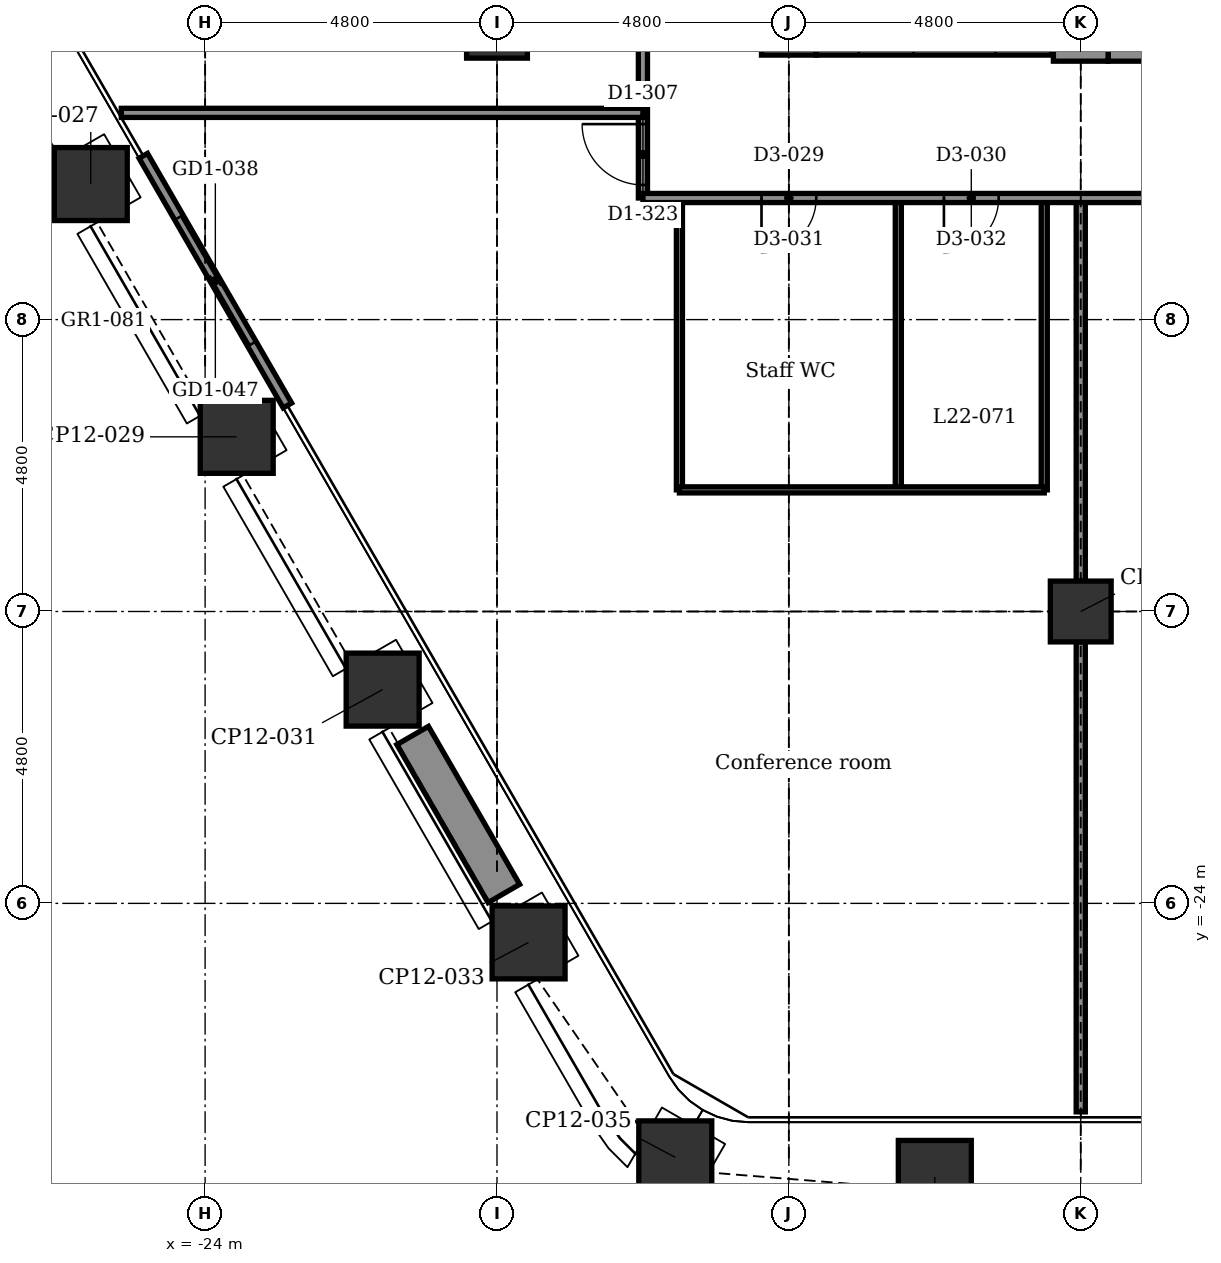
"""IFC4 building model, lengths in metres.
Left out: names, types, materials, properties, quantities, classifications, styles, units other than length and angle.
Written with IfcOpenShell. Run it as: python <this file> out.ifc"""

import sys

from ifc_helpers import new_model, si_unit, direction, frame, frame_2d, origin, origin_2d, place, context, subcontext, project, spatial, rectangle, extrude, element, fill, save


model = new_model("IFC4")
c1 = context("Model", 3, precision=1e-05, world=origin(), true_north=direction((0.0, 1.0)))
c2 = subcontext(c1, "Body", "Model", "MODEL_VIEW")
j1 = project(units=[si_unit("LENGTHUNIT", "METRE"), si_unit("PLANEANGLEUNIT", "RADIAN")], contexts=[c1])
p1 = place(None, origin())
s1 = spatial("IfcSite", under=j1, at=p1, CompositionType="ELEMENT")
p2 = place(p1, origin())
s2 = spatial("IfcBuilding", under=s1, at=p2, CompositionType="ELEMENT")
p3 = place(p2, frame((0.0, 0.0, 113.9)))
s3 = spatial("IfcBuildingStorey", under=s2, at=p3, CompositionType="ELEMENT", Elevation=113.9)
for number, where, z_axis, x_axis in (
    (1, (-12.0, -28.499, -0.2), (0.0, 0.0, 1.0), (1.0, 0.0, 0.0)),
    (2, (-16.268, -28.177, -0.2), (0.0, 0.0, 1.0), (0.5, 0.866, 0.0)),
    (3, (-18.68, -24.642, -0.2), (0.0, 0.0, 1.0), (0.866, 0.5, 0.0)),
    (4, (-21.08, -20.485, -0.2), (0.0, 0.0, 1.0), (0.866, 0.5, 0.0)),
    (5, (-23.48, -16.328, -0.2), (0.0, 0.0, 1.0), (0.866, 0.5, 0.0)),
    (6, (-25.88, -12.171, -0.2), (0.0, 0.0, 1.0), (0.866, 0.5, 0.0)),
):
    element("IfcColumn", number, at=place(p3, frame(where, z_axis=z_axis, x_axis=x_axis)), inside=s3, PredefinedType="COLUMN", context=c2, shape_type="SweptSolid", body=[
        extrude(rectangle(XDim=1.2, YDim=1.2, at=origin_2d()), origin(), (0.0, 0.0, 1.0), 4.5),
    ])
for number, where, z_axis, x_axis in (
    (7, (-19.2, -9.6, -0.2), (0.0, 0.0, 1.0), (1.0, 0.0, 0.0)),
    (8, (-9.6, -19.2, -0.2), (0.0, 0.0, 1.0), (1.0, 0.0, 0.0)),
):
    element("IfcColumn", number, at=place(p3, frame(where, z_axis=z_axis, x_axis=x_axis)), inside=s3, PredefinedType="COLUMN", context=c2, shape_type="SweptSolid", body=[
        extrude(rectangle(XDim=1.0, YDim=1.0, at=origin_2d()), origin(), (0.0, 0.0, 1.0), 4.5),
    ])
p4 = place(p3, frame((-9.15, -10.0, -0.2), z_axis=(0.0, 0.0, 1.0), x_axis=(1.0, 0.0, 0.0)))
e9 = element("IfcWall", 9, at=p4, inside=s3, PredefinedType="STANDARD", context=c2, shape_type="SweptSolid", body=[
    extrude(rectangle(XDim=3.9, YDim=0.3, at=frame_2d((1.95, 0.0))), origin(), (0.0, 0.0, 1.0), 4.5),
])
p5 = place(p3, frame((-13.95, -9.6, -0.2), z_axis=(0.0, 0.0, 1.0), x_axis=(1.0, 0.0, 0.0)))
e10 = element("IfcWall", 10, at=p5, inside=s3, PredefinedType="SHEAR", context=c2, shape_type="SweptSolid", body=[
    extrude(rectangle(XDim=3.9, YDim=0.9, at=frame_2d((1.95, 0.0))), origin(), (0.0, 0.0, 1.0), 4.5),
])
p6 = place(p5, frame((0.7, 0.0, 0.2)))
e11 = element("IfcOpeningElement", 11, at=p6, cuts=e10, PredefinedType="OPENING", context=c2, shape_type="SweptSolid", body=[
    extrude(rectangle(XDim=0.9, YDim=2.1, at=frame_2d((0.45, 1.05))), frame((0.0, 0.46, 0.0), z_axis=(0.0, -1.0, 0.0), x_axis=(1.0, 0.0, 0.0)), (0.0, 0.0, 1.0), 0.92),
])
p7 = place(p5, frame((2.95, 0.0, 0.2)))
e12 = element("IfcOpeningElement", 12, at=p7, cuts=e10, PredefinedType="OPENING", context=c2, shape_type="SweptSolid", body=[
    extrude(rectangle(XDim=0.9, YDim=2.1, at=frame_2d((0.45, 1.05))), frame((0.0, 0.46, 0.0), z_axis=(0.0, -1.0, 0.0), x_axis=(1.0, 0.0, 0.0)), (0.0, 0.0, 1.0), 0.92),
])
p8 = place(p3, frame((-14.4, -10.05, -0.2), z_axis=(0.0, 0.0, 1.0), x_axis=(0.0, 1.0, 0.0)))
e13 = element("IfcWall", 13, at=p8, inside=s3, PredefinedType="SHEAR", context=c2, shape_type="SweptSolid", body=[
    extrude(rectangle(XDim=20.1, YDim=0.9, at=frame_2d((10.05, 0.0))), origin(), (0.0, 0.0, 1.0), 4.5),
])
p9 = place(p8, frame((3.5, 0.0, 0.2)))
e14 = element("IfcOpeningElement", 14, at=p9, cuts=e13, PredefinedType="OPENING", context=c2, shape_type="SweptSolid", body=[
    extrude(rectangle(XDim=1.1, YDim=2.1, at=frame_2d((0.55, 1.05))), frame((0.0, 0.46, 0.0), z_axis=(0.0, -1.0, 0.0), x_axis=(1.0, 0.0, 0.0)), (0.0, 0.0, 1.0), 0.92),
])
p10 = place(p8, frame((5.9, 0.0, 0.2)))
e15 = element("IfcOpeningElement", 15, at=p10, cuts=e13, PredefinedType="OPENING", context=c2, shape_type="SweptSolid", body=[
    extrude(rectangle(XDim=1.1, YDim=2.1, at=frame_2d((0.55, 1.05))), frame((0.0, 0.46, 0.0), z_axis=(0.0, -1.0, 0.0), x_axis=(1.0, 0.0, 0.0)), (0.0, 0.0, 1.0), 0.92),
])
p11 = place(p8, frame((8.3, 0.0, 0.2)))
e16 = element("IfcOpeningElement", 16, at=p11, cuts=e13, PredefinedType="OPENING", context=c2, shape_type="SweptSolid", body=[
    extrude(rectangle(XDim=1.1, YDim=2.1, at=frame_2d((0.55, 1.05))), frame((0.0, 0.46, 0.0), z_axis=(0.0, -1.0, 0.0), x_axis=(1.0, 0.0, 0.0)), (0.0, 0.0, 1.0), 0.92),
])
p12 = place(p8, frame((10.7, 0.0, 0.2)))
e17 = element("IfcOpeningElement", 17, at=p12, cuts=e13, PredefinedType="OPENING", context=c2, shape_type="SweptSolid", body=[
    extrude(rectangle(XDim=1.1, YDim=2.1, at=frame_2d((0.55, 1.05))), frame((0.0, 0.46, 0.0), z_axis=(0.0, -1.0, 0.0), x_axis=(1.0, 0.0, 0.0)), (0.0, 0.0, 1.0), 0.92),
])
p13 = place(p3, frame((-9.6, -10.15, -0.2), z_axis=(0.0, 0.0, 1.0), x_axis=(0.0, 1.0, 0.0)))
e18 = element("IfcWall", 18, at=p13, inside=s3, PredefinedType="SHEAR", context=c2, shape_type="SweptSolid", body=[
    extrude(rectangle(XDim=7.6, YDim=0.9, at=frame_2d((3.8, 0.0))), origin(), (0.0, 0.0, 1.0), 4.5),
])
p14 = place(p3, frame((-22.647, -15.812, 0.0), z_axis=(0.0, 0.0, 1.0), x_axis=(-0.499978080042, 0.866038058908, 0.0)))
e19 = element("IfcWall", 19, at=p14, inside=s3, PredefinedType="PARTITIONING", context=c2, shape_type="SweptSolid", body=[
    extrude(rectangle(XDim=4.74, YDim=0.16, at=frame_2d((2.37, 0.0))), origin(), (0.0, 0.0, 1.0), 4.3),
])
p15 = place(p14, frame((1.17, 0.0, 0.0)))
e20 = element("IfcOpeningElement", 20, at=p15, cuts=e19, PredefinedType="OPENING", context=c2, shape_type="SweptSolid", body=[
    extrude(rectangle(XDim=2.4, YDim=2.4, at=frame_2d((1.2, 1.2))), frame((0.0, 0.09, 0.0), z_axis=(0.0, -1.0, 0.0), x_axis=(1.0, 0.0, 0.0)), (0.0, 0.0, 1.0), 0.18),
])
p16 = place(p3, frame((-19.087, -23.837, 0.0), z_axis=(0.0, 0.0, 1.0), x_axis=(-0.499990139034, 0.866031096941, 0.0)))
e21 = element("IfcWall", 21, at=p16, inside=s3, PredefinedType="USERDEFINED", context=c2, shape_type="SweptSolid", body=[
    extrude(rectangle(XDim=3.0, YDim=0.6, at=frame_2d((1.5, 0.0))), origin(), (0.0, 0.0, 1.0), 0.7),
])
p17 = place(p3, frame((-9.6, -27.428, 0.0), z_axis=(0.0, 0.0, 1.0), x_axis=(0.0, 1.0, 0.0)))
e22 = element("IfcWall", 22, at=p17, inside=s3, PredefinedType="PARTITIONING", context=c2, shape_type="SweptSolid", body=[
    extrude(rectangle(XDim=7.729, YDim=0.15, at=frame_2d((3.864, 0.0))), origin(), (0.0, 0.0, 1.0), 3.843),
])
p18 = place(p3, frame((-9.6, -18.7, 0.0), z_axis=(0.0, 0.0, 1.0), x_axis=(0.0, 1.0, 0.0)))
e23 = element("IfcWall", 23, at=p18, inside=s3, PredefinedType="PARTITIONING", context=c2, shape_type="SweptSolid", body=[
    extrude(rectangle(XDim=6.3, YDim=0.15, at=frame_2d((3.15, 0.0))), origin(), (0.0, 0.0, 1.0), 3.843),
])
for number, where, z_axis, x_axis in (
    (24, (-10.2, -17.2, 0.0), (0.0, 0.0, 1.0), (0.0, 1.0, 0.0)),
    (25, (-12.6, -17.2, 0.0), (0.0, 0.0, 1.0), (0.0, 1.0, 0.0)),
    (26, (-16.2, -17.2, 0.0), (0.0, 0.0, 1.0), (0.0, 1.0, 0.0)),
):
    element("IfcWall", number, at=place(p3, frame(where, z_axis=z_axis, x_axis=x_axis)), inside=s3, PredefinedType="PARTITIONING", context=c2, shape_type="SweptSolid", body=[
        extrude(rectangle(XDim=4.8, YDim=0.1, at=frame_2d((2.4, 0.0))), origin(), (0.0, 0.0, 1.0), 4.3),
    ])
p19 = place(p3, frame((-16.8, -12.4, 0.0), z_axis=(0.0, 0.0, 1.0), x_axis=(0.0, 1.0, 0.0)))
e27 = element("IfcWall", 27, at=p19, inside=s3, PredefinedType="PARTITIONING", context=c2, shape_type="SweptSolid", body=[
    extrude(rectangle(XDim=8.45, YDim=0.15, at=frame_2d((4.225, 0.0))), origin(), (0.0, 0.0, 1.0), 4.3),
])
p20 = place(p19, frame((0.215, 0.0, 0.0)))
e28 = element("IfcOpeningElement", 28, at=p20, cuts=e27, PredefinedType="OPENING", context=c2, shape_type="SweptSolid", body=[
    extrude(rectangle(XDim=1.0, YDim=2.1, at=frame_2d((0.5, 1.05))), frame((0.0, 0.085, 0.0), z_axis=(0.0, -1.0, 0.0), x_axis=(1.0, 0.0, 0.0)), (0.0, 0.0, 1.0), 0.17),
])
p21 = place(p19, frame((5.2, 0.0, 0.0)))
e29 = element("IfcOpeningElement", 29, at=p21, cuts=e27, PredefinedType="OPENING", context=c2, shape_type="SweptSolid", body=[
    extrude(rectangle(XDim=1.0, YDim=2.1, at=frame_2d((0.5, 1.05))), frame((0.0, 0.085, 0.0), z_axis=(0.0, -1.0, 0.0), x_axis=(1.0, 0.0, 0.0)), (0.0, 0.0, 1.0), 0.17),
])
p22 = place(p3, frame((-16.2, -17.2, 0.0), z_axis=(0.0, 0.0, 1.0), x_axis=(1.0, 0.0, 0.0)))
e30 = element("IfcWall", 30, at=p22, inside=s3, PredefinedType="PARTITIONING", context=c2, shape_type="SweptSolid", body=[
    extrude(rectangle(XDim=6.0, YDim=0.1, at=frame_2d((3.0, 0.0))), origin(), (0.0, 0.0, 1.0), 4.3),
])
p23 = place(p3, frame((-16.8, -12.4, 0.0), z_axis=(0.0, 0.0, 1.0), x_axis=(1.0, 0.0, 0.0)))
e31 = element("IfcWall", 31, at=p23, inside=s3, PredefinedType="PARTITIONING", context=c2, shape_type="SweptSolid", body=[
    extrude(rectangle(XDim=33.6, YDim=0.15, at=frame_2d((16.8, 0.0))), origin(), (0.0, 0.0, 1.0), 4.3),
])
p24 = place(p23, frame((9.1, 0.0, 0.0)))
e32 = element("IfcOpeningElement", 32, at=p24, cuts=e31, PredefinedType="OPENING", context=c2, shape_type="SweptSolid", body=[
    extrude(rectangle(XDim=1.0, YDim=2.1, at=frame_2d((0.5, 1.05))), frame((0.0, 0.085, 0.0), z_axis=(0.0, -1.0, 0.0), x_axis=(1.0, 0.0, 0.0)), (0.0, 0.0, 1.0), 0.17),
])
p25 = place(p23, frame((14.915, 0.0, 0.0)))
e33 = element("IfcOpeningElement", 33, at=p25, cuts=e31, PredefinedType="OPENING", context=c2, shape_type="SweptSolid", body=[
    extrude(rectangle(XDim=1.0, YDim=2.1, at=frame_2d((0.5, 1.05))), frame((0.0, 0.085, 0.0), z_axis=(0.0, -1.0, 0.0), x_axis=(1.0, 0.0, 0.0)), (0.0, 0.0, 1.0), 0.17),
])
p26 = place(p23, frame((17.685, 0.0, 0.0)))
e34 = element("IfcOpeningElement", 34, at=p26, cuts=e31, PredefinedType="OPENING", context=c2, shape_type="SweptSolid", body=[
    extrude(rectangle(XDim=1.0, YDim=2.1, at=frame_2d((0.5, 1.05))), frame((0.0, 0.085, 0.0), z_axis=(0.0, -1.0, 0.0), x_axis=(1.0, 0.0, 0.0)), (0.0, 0.0, 1.0), 0.17),
])
p27 = place(p23, frame((24.225, 0.0, 0.0)))
e35 = element("IfcOpeningElement", 35, at=p27, cuts=e31, PredefinedType="OPENING", context=c2, shape_type="SweptSolid", body=[
    extrude(rectangle(XDim=1.0, YDim=2.1, at=frame_2d((0.5, 1.05))), frame((0.0, 0.085, 0.0), z_axis=(0.0, -1.0, 0.0), x_axis=(1.0, 0.0, 0.0)), (0.0, 0.0, 1.0), 0.17),
])
p28 = place(p23, frame((29.5, 0.0, 0.0)))
e36 = element("IfcOpeningElement", 36, at=p28, cuts=e31, PredefinedType="OPENING", context=c2, shape_type="SweptSolid", body=[
    extrude(rectangle(XDim=1.0, YDim=2.1, at=frame_2d((0.5, 1.05))), frame((0.0, 0.085, 0.0), z_axis=(0.0, -1.0, 0.0), x_axis=(1.0, 0.0, 0.0)), (0.0, 0.0, 1.0), 0.17),
])
p29 = place(p23, frame((1.95, 0.0, 0.0)))
e37 = element("IfcOpeningElement", 37, at=p29, cuts=e31, PredefinedType="OPENING", context=c2, shape_type="SweptSolid", body=[
    extrude(rectangle(XDim=0.9, YDim=2.1, at=frame_2d((0.45, 1.05))), frame((0.0, 0.085, 0.0), z_axis=(0.0, -1.0, 0.0), x_axis=(1.0, 0.0, 0.0)), (0.0, 0.0, 1.0), 0.17),
])
p30 = place(p23, frame((4.95, 0.0, 0.0)))
e38 = element("IfcOpeningElement", 38, at=p30, cuts=e31, PredefinedType="OPENING", context=c2, shape_type="SweptSolid", body=[
    extrude(rectangle(XDim=0.9, YDim=2.1, at=frame_2d((0.45, 1.05))), frame((0.0, 0.085, 0.0), z_axis=(0.0, -1.0, 0.0), x_axis=(1.0, 0.0, 0.0)), (0.0, 0.0, 1.0), 0.17),
])
p31 = place(p3, frame((-25.378, -11.0, 0.0), z_axis=(0.0, 0.0, 1.0), x_axis=(1.0, 0.0, 0.0)))
e39 = element("IfcWall", 39, at=p31, inside=s3, PredefinedType="PARTITIONING", context=c2, shape_type="SweptSolid", body=[
    extrude(rectangle(XDim=8.578, YDim=0.15, at=frame_2d((4.289, 0.0))), origin(), (0.0, 0.0, 1.0), 4.3),
])
p32 = place(p15, origin())
e40 = element("IfcDoor", 40, at=p32, inside=s3, OperationType="DOUBLE_DOOR_SLIDING", PredefinedType="DOOR", context=c2, shape_type="SweptSolid", body=[
    extrude(rectangle(XDim=2.4, YDim=2.4, at=frame_2d((1.2, 1.2))), frame((0.0, 0.025, 0.0), z_axis=(0.0, -1.0, 0.0), x_axis=(1.0, 0.0, 0.0)), (0.0, 0.0, 1.0), 0.05),
])
fill(e20, e40)
p33 = place(p20, origin())
e41 = element("IfcDoor", 41, at=p33, inside=s3, OperationType="SINGLE_SWING_RIGHT", PredefinedType="DOOR", context=c2, shape_type="SweptSolid", body=[
    extrude(rectangle(XDim=1.0, YDim=2.1, at=frame_2d((0.5, 1.05))), frame((0.0, 0.025, 0.0), z_axis=(0.0, -1.0, 0.0), x_axis=(1.0, 0.0, 0.0)), (0.0, 0.0, 1.0), 0.05),
])
fill(e28, e41)
p34 = place(p29, frame((0.9, 0.0, 0.0), z_axis=(0.0, 0.0, 1.0), x_axis=(-1.0, 0.0, 0.0)))
e42 = element("IfcDoor", 42, at=p34, inside=s3, OperationType="SINGLE_SWING_LEFT", PredefinedType="DOOR", context=c2, shape_type="SweptSolid", body=[
    extrude(rectangle(XDim=0.9, YDim=2.1, at=frame_2d((0.45, 1.05))), frame((0.0, 0.025, 0.0), z_axis=(0.0, -1.0, 0.0), x_axis=(1.0, 0.0, 0.0)), (0.0, 0.0, 1.0), 0.05),
])
fill(e37, e42)
p35 = place(p30, frame((0.9, 0.0, 0.0), z_axis=(0.0, 0.0, 1.0), x_axis=(-1.0, 0.0, 0.0)))
e43 = element("IfcDoor", 43, at=p35, inside=s3, OperationType="SINGLE_SWING_LEFT", PredefinedType="DOOR", context=c2, shape_type="SweptSolid", body=[
    extrude(rectangle(XDim=0.9, YDim=2.1, at=frame_2d((0.45, 1.05))), frame((0.0, 0.025, 0.0), z_axis=(0.0, -1.0, 0.0), x_axis=(1.0, 0.0, 0.0)), (0.0, 0.0, 1.0), 0.05),
])
fill(e38, e43)
save(model, sys.argv[1])
